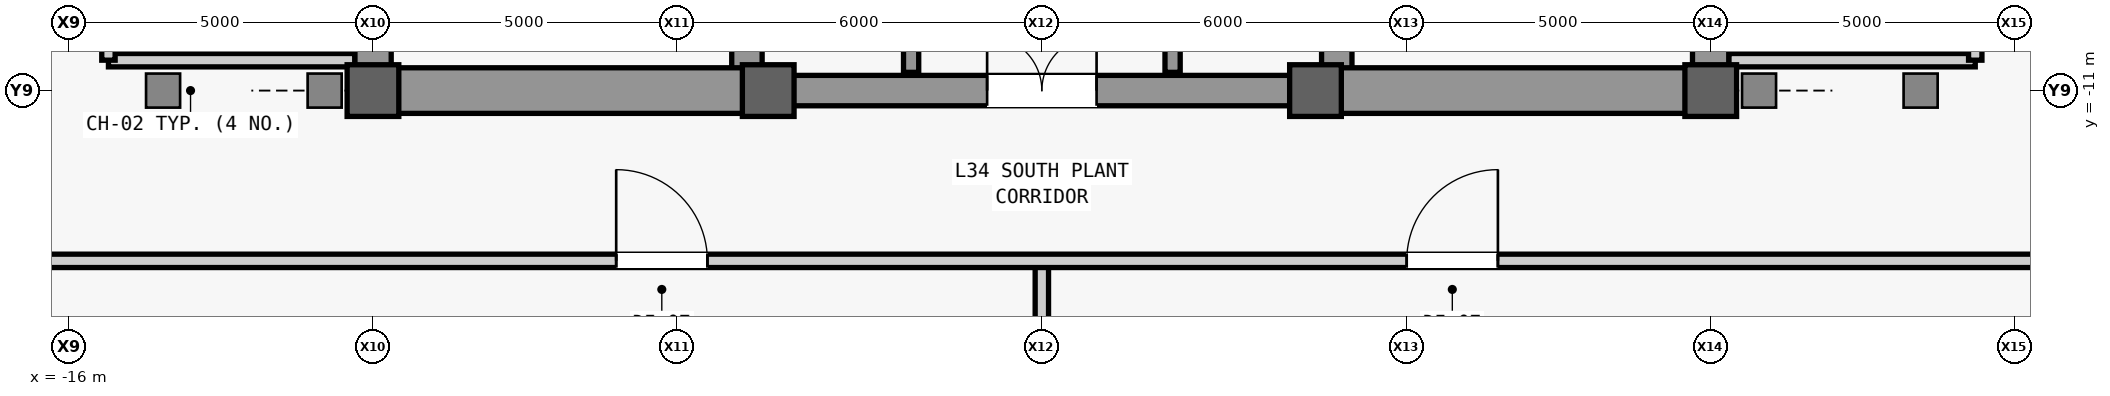
"""IFC4 building model, lengths in metres.
Left out: names, types, materials, properties, quantities, classifications, styles, units other than length and angle.
Written with IfcOpenShell. Run it as: python <this file> out.ifc"""

import sys

from ifc_helpers import new_model, si_unit, direction, frame, frame_2d, origin, origin_2d, place, context, subcontext, project, spatial, rectangle, extrude, source, transform, mapped, element, fill, save


model = new_model("IFC4")
c1 = context("Model", 3, precision=1e-05, world=origin(), true_north=direction((0.0, 1.0)))
c2 = subcontext(c1, "Body", "Model", "MODEL_VIEW")
j1 = project(units=[si_unit("LENGTHUNIT", "METRE"), si_unit("PLANEANGLEUNIT", "RADIAN")], contexts=[c1])
p1 = place(None, origin())
s1 = spatial("IfcSite", under=j1, at=p1, CompositionType="ELEMENT")
p2 = place(p1, origin())
s2 = spatial("IfcBuilding", under=s1, at=p2, CompositionType="ELEMENT")
p3 = place(p2, frame((0.0, 0.0, 149.9)))
s3 = spatial("IfcBuildingStorey", under=s2, at=p3, CompositionType="ELEMENT", Elevation=149.9)
m1 = source(origin(), c2, "Body", "SweptSolid", [
    extrude(rectangle(XDim=22.0, YDim=0.6, at=frame_2d((11.0, 0.0))), origin(), (0.0, 0.0, 1.0), 4.98),
])
p4 = place(p3, frame((-11.0, -11.0, 0.0), z_axis=(0.0, 0.0, 1.0), x_axis=(0.0, 1.0, 0.0)))
e1 = element("IfcWall", 1, at=p4, inside=s3, PredefinedType="SHEAR", context=c2, shape_type="MappedRepresentation", body=[
    mapped(m1, transform((0.0, 0.0, 0.0), scale=1.0)),
])
m2 = source(origin(), c2, "Body", "SweptSolid", [
    extrude(rectangle(XDim=1.1, YDim=2.2, at=frame_2d((0.55, 1.1))), frame((0.0, 0.31, 0.0), z_axis=(0.0, -1.0, 0.0), x_axis=(1.0, 0.0, 0.0)), (0.0, 0.0, 1.0), 0.62),
])
p5 = place(p4, frame((0.8, 0.0, 0.0)))
e2 = element("IfcOpeningElement", 2, at=p5, cuts=e1, PredefinedType="OPENING", context=c2, shape_type="MappedRepresentation", body=[
    mapped(m2, transform((0.0, 0.0, 0.0), scale=1.0)),
])
p6 = place(p4, frame((12.5, 0.0, 0.0)))
e3 = element("IfcOpeningElement", 3, at=p6, cuts=e1, PredefinedType="OPENING", context=c2, shape_type="MappedRepresentation", body=[
    mapped(m2, transform((0.0, 0.0, 0.0), scale=1.0)),
])
m3 = source(origin(), c2, "Body", "SweptSolid", [
    extrude(rectangle(XDim=0.9, YDim=2.15, at=frame_2d((0.45, 1.075))), frame((0.0, 0.31, 0.0), z_axis=(0.0, -1.0, 0.0), x_axis=(1.0, 0.0, 0.0)), (0.0, 0.0, 1.0), 0.62),
])
p7 = place(p4, frame((7.575, 0.0, 0.0)))
e4 = element("IfcOpeningElement", 4, at=p7, cuts=e1, PredefinedType="OPENING", context=c2, shape_type="MappedRepresentation", body=[
    mapped(m3, transform((0.0, 0.0, 0.0), scale=1.0)),
])
m4 = source(origin(), c2, "Body", "SweptSolid", [
    extrude(rectangle(XDim=1.3, YDim=2.3, at=frame_2d((0.65, 1.15))), frame((0.0, 0.31, 0.0), z_axis=(0.0, -1.0, 0.0), x_axis=(1.0, 0.0, 0.0)), (0.0, 0.0, 1.0), 0.62),
])
p8 = place(p4, frame((2.7, 0.0, 0.0)))
e5 = element("IfcOpeningElement", 5, at=p8, cuts=e1, PredefinedType="OPENING", context=c2, shape_type="MappedRepresentation", body=[
    mapped(m4, transform((0.0, 0.0, 0.0), scale=1.0)),
])
p9 = place(p3, frame((11.0, -11.0, 0.0), z_axis=(0.0, 0.0, 1.0), x_axis=(0.0, 1.0, 0.0)))
e6 = element("IfcWall", 6, at=p9, inside=s3, PredefinedType="SHEAR", context=c2, shape_type="MappedRepresentation", body=[
    mapped(m1, transform((0.0, 0.0, 0.0), scale=1.0)),
])
p10 = place(p9, frame((0.8, 0.0, 0.0)))
e7 = element("IfcOpeningElement", 7, at=p10, cuts=e6, PredefinedType="OPENING", context=c2, shape_type="MappedRepresentation", body=[
    mapped(m2, transform((0.0, 0.0, 0.0), scale=1.0)),
])
p11 = place(p9, frame((7.575, 0.0, 0.0)))
e8 = element("IfcOpeningElement", 8, at=p11, cuts=e6, PredefinedType="OPENING", context=c2, shape_type="MappedRepresentation", body=[
    mapped(m3, transform((0.0, 0.0, 0.0), scale=1.0)),
])
p12 = place(p9, frame((2.7, 0.0, 0.0)))
e9 = element("IfcOpeningElement", 9, at=p12, cuts=e6, PredefinedType="OPENING", context=c2, shape_type="MappedRepresentation", body=[
    mapped(m4, transform((0.0, 0.0, 0.0), scale=1.0)),
])
p13 = place(p9, frame((13.35, 0.0, 0.0)))
e10 = element("IfcOpeningElement", 10, at=p13, cuts=e6, PredefinedType="OPENING", context=c2, shape_type="MappedRepresentation", body=[
    mapped(m4, transform((0.0, 0.0, 0.0), scale=1.0)),
])
m5 = source(origin(), c2, "Body", "SweptSolid", [
    extrude(rectangle(XDim=21.4, YDim=0.5, at=frame_2d((10.7, 0.0))), origin(), (0.0, 0.0, 1.0), 4.98),
])
for number, where, z_axis, x_axis in (
    (11, (-4.85, -10.7, 0.0), (0.0, 0.0, 1.0), (0.0, 1.0, 0.0)),
    (12, (4.85, -10.7, 0.0), (0.0, 0.0, 1.0), (0.0, 1.0, 0.0)),
):
    element("IfcWall", number, at=place(p3, frame(where, z_axis=z_axis, x_axis=x_axis)), inside=s3, PredefinedType="SHEAR", context=c2, shape_type="MappedRepresentation", body=[
        mapped(m5, transform((0.0, 0.0, 0.0), scale=1.0)),
    ])
m6 = source(origin(), c2, "Body", "SweptSolid", [
    extrude(rectangle(XDim=5.85, YDim=0.75, at=frame_2d((2.925, 0.0))), origin(), (0.0, 0.0, 1.0), 4.98),
])
for number, where, z_axis, x_axis in (
    (13, (-10.7, -11.0, 0.0), (0.0, 0.0, 1.0), (1.0, 0.0, 0.0)),
    (14, (4.85, -11.0, 0.0), (0.0, 0.0, 1.0), (1.0, 0.0, 0.0)),
):
    element("IfcWall", number, at=place(p3, frame(where, z_axis=z_axis, x_axis=x_axis)), inside=s3, PredefinedType="SHEAR", context=c2, shape_type="MappedRepresentation", body=[
        mapped(m6, transform((0.0, 0.0, 0.0), scale=1.0)),
    ])
m7 = source(origin(), c2, "Body", "SweptSolid", [
    extrude(rectangle(XDim=9.2, YDim=0.5, at=frame_2d((4.6, 0.0))), origin(), (0.0, 0.0, 1.0), 4.98),
])
p14 = place(p3, frame((-4.6, -11.0, 0.0), z_axis=(0.0, 0.0, 1.0), x_axis=(1.0, 0.0, 0.0)))
e15 = element("IfcWall", 15, at=p14, inside=s3, PredefinedType="SHEAR", context=c2, shape_type="MappedRepresentation", body=[
    mapped(m7, transform((0.0, 0.0, 0.0), scale=1.0)),
])
m8 = source(origin(), c2, "Body", "SweptSolid", [
    extrude(rectangle(XDim=1.8, YDim=2.25, at=frame_2d((0.9, 1.125))), frame((0.0, 0.26, 0.0), z_axis=(0.0, -1.0, 0.0), x_axis=(1.0, 0.0, 0.0)), (0.0, 0.0, 1.0), 0.52),
])
p15 = place(p14, frame((3.7, 0.0, 0.0)))
e16 = element("IfcOpeningElement", 16, at=p15, cuts=e15, PredefinedType="OPENING", context=c2, shape_type="MappedRepresentation", body=[
    mapped(m8, transform((0.0, 0.0, 0.0), scale=1.0)),
])
m9 = source(origin(), c2, "Body", "SweptSolid", [
    extrude(rectangle(XDim=0.85, YDim=0.85, at=origin_2d()), origin(), (0.0, 0.0, 1.0), 5.2),
])
for number, where, z_axis, x_axis in (
    (17, (-11.0, -11.0, 0.0), (0.0, 0.0, 1.0), (1.0, 0.0, 0.0)),
    (18, (-4.5, -11.0, 0.0), (0.0, 0.0, 1.0), (1.0, 0.0, 0.0)),
    (19, (4.5, -11.0, 0.0), (0.0, 0.0, 1.0), (1.0, 0.0, 0.0)),
    (20, (11.0, -11.0, 0.0), (0.0, 0.0, 1.0), (1.0, 0.0, 0.0)),
):
    element("IfcColumn", number, at=place(p3, frame(where, z_axis=z_axis, x_axis=x_axis)), inside=s3, PredefinedType="COLUMN", context=c2, shape_type="MappedRepresentation", body=[
        mapped(m9, transform((0.0, 0.0, 0.0), scale=1.0)),
    ])
m10 = source(origin(), c2, "Body", "SweptSolid", [
    extrude(rectangle(XDim=4.05, YDim=0.22, at=frame_2d((2.025, 0.0))), origin(), (0.0, 0.0, 1.0), 4.98),
])
p16 = place(p3, frame((-15.35, -10.5, 0.0), z_axis=(0.0, 0.0, 1.0), x_axis=(1.0, 0.0, 0.0)))
e21 = element("IfcWall", 21, at=p16, inside=s3, PredefinedType="PARTITIONING", context=c2, shape_type="MappedRepresentation", body=[
    mapped(m10, transform((0.0, 0.0, 0.0), scale=1.0)),
])
m11 = source(origin(), c2, "Body", "SweptSolid", [
    extrude(rectangle(XDim=4.4, YDim=0.22, at=frame_2d((2.2, 0.0))), origin(), (0.0, 0.0, 1.0), 4.98),
])
p17 = place(p3, frame((-15.35, -10.5, 0.0), z_axis=(0.0, 0.0, 1.0), x_axis=(0.0, 1.0, 0.0)))
e22 = element("IfcWall", 22, at=p17, inside=s3, PredefinedType="PARTITIONING", context=c2, shape_type="MappedRepresentation", body=[
    mapped(m11, transform((0.0, 0.0, 0.0), scale=1.0)),
])
m12 = source(origin(), c2, "Body", "SweptSolid", [
    extrude(rectangle(XDim=1.2, YDim=2.2, at=frame_2d((0.6, 1.1))), frame((0.0, 0.12, 0.0), z_axis=(0.0, -1.0, 0.0), x_axis=(1.0, 0.0, 0.0)), (0.0, 0.0, 1.0), 0.24),
])
p18 = place(p17, frame((1.6, 0.0, 0.0)))
e23 = element("IfcOpeningElement", 23, at=p18, cuts=e22, PredefinedType="OPENING", context=c2, shape_type="MappedRepresentation", body=[
    mapped(m12, transform((0.0, 0.0, 0.0), scale=1.0)),
])
p19 = place(p3, frame((11.3, -10.5, 0.0), z_axis=(0.0, 0.0, 1.0), x_axis=(1.0, 0.0, 0.0)))
e24 = element("IfcWall", 24, at=p19, inside=s3, PredefinedType="PARTITIONING", context=c2, shape_type="MappedRepresentation", body=[
    mapped(m10, transform((0.0, 0.0, 0.0), scale=1.0)),
])
p20 = place(p3, frame((15.35, -10.5, 0.0), z_axis=(0.0, 0.0, 1.0), x_axis=(0.0, 1.0, 0.0)))
e25 = element("IfcWall", 25, at=p20, inside=s3, PredefinedType="PARTITIONING", context=c2, shape_type="MappedRepresentation", body=[
    mapped(m11, transform((0.0, 0.0, 0.0), scale=1.0)),
])
p21 = place(p20, frame((1.6, 0.0, 0.0)))
e26 = element("IfcOpeningElement", 26, at=p21, cuts=e25, PredefinedType="OPENING", context=c2, shape_type="MappedRepresentation", body=[
    mapped(m12, transform((0.0, 0.0, 0.0), scale=1.0)),
])
m13 = source(origin(), c2, "Body", "SweptSolid", [
    extrude(rectangle(XDim=5.4, YDim=0.25, at=frame_2d((2.7, 0.0))), origin(), (0.0, 0.0, 1.0), 4.98),
])
for number, where, z_axis, x_axis in (
    (27, (-2.15, -10.7, 0.0), (0.0, 0.0, 1.0), (0.0, 1.0, 0.0)),
    (28, (2.15, -10.7, 0.0), (0.0, 0.0, 1.0), (0.0, 1.0, 0.0)),
):
    element("IfcWall", number, at=place(p3, frame(where, z_axis=z_axis, x_axis=x_axis)), inside=s3, PredefinedType="SHEAR", context=c2, shape_type="MappedRepresentation", body=[
        mapped(m13, transform((0.0, 0.0, 0.0), scale=1.0)),
    ])
m14 = source(origin(), c2, "Body", "SweptSolid", [
    extrude(rectangle(XDim=16.2, YDim=0.22, at=frame_2d((8.1, 0.0))), origin(), (0.0, 0.0, 1.0), 4.127),
])
p22 = place(p3, frame((0.0, -30.0, 0.0), z_axis=(0.0, 0.0, 1.0), x_axis=(0.0, 1.0, 0.0)))
e29 = element("IfcWall", 29, at=p22, inside=s3, PredefinedType="PARTITIONING", context=c2, shape_type="MappedRepresentation", body=[
    mapped(m14, transform((0.0, 0.0, 0.0), scale=1.0)),
])
m15 = source(origin(), c2, "Body", "SweptSolid", [
    extrude(rectangle(XDim=51.0, YDim=0.22, at=frame_2d((25.5, 0.0))), origin(), (0.0, 0.0, 1.0), 4.98),
])
p23 = place(p3, frame((-25.5, -13.8, 0.0), z_axis=(0.0, 0.0, 1.0), x_axis=(1.0, 0.0, 0.0)))
e30 = element("IfcWall", 30, at=p23, inside=s3, PredefinedType="PARTITIONING", context=c2, shape_type="MappedRepresentation", body=[
    mapped(m15, transform((0.0, 0.0, 0.0), scale=1.0)),
])
m16 = source(origin(), c2, "Body", "SweptSolid", [
    extrude(rectangle(XDim=1.5, YDim=2.3, at=frame_2d((0.75, 1.15))), frame((0.0, 0.12, 0.0), z_axis=(0.0, -1.0, 0.0), x_axis=(1.0, 0.0, 0.0)), (0.0, 0.0, 1.0), 0.24),
])
p24 = place(p23, frame((18.5, 0.0, 0.0)))
e31 = element("IfcOpeningElement", 31, at=p24, cuts=e30, PredefinedType="OPENING", context=c2, shape_type="MappedRepresentation", body=[
    mapped(m16, transform((0.0, 0.0, 0.0), scale=1.0)),
])
p25 = place(p23, frame((31.5, 0.0, 0.0)))
e32 = element("IfcOpeningElement", 32, at=p25, cuts=e30, PredefinedType="OPENING", context=c2, shape_type="MappedRepresentation", body=[
    mapped(m16, transform((0.0, 0.0, 0.0), scale=1.0)),
])
m17 = source(origin(), c2, "Body", "SweptSolid", [
    extrude(rectangle(XDim=1.8, YDim=2.25, at=frame_2d((0.9, 1.125))), frame((0.0, 0.025, 0.0), z_axis=(0.0, -1.0, 0.0), x_axis=(1.0, 0.0, 0.0)), (0.0, 0.0, 1.0), 0.05),
])
p26 = place(p15, origin())
e33 = element("IfcDoor", 33, at=p26, inside=s3, OperationType="SINGLE_SWING_LEFT", PredefinedType="DOOR", context=c2, shape_type="MappedRepresentation", body=[
    mapped(m17, transform((0.0, 0.0, 0.0), scale=1.0)),
])
fill(e16, e33)
m18 = source(origin(), c2, "Body", "SweptSolid", [
    extrude(rectangle(XDim=1.5, YDim=2.3, at=frame_2d((0.75, 1.15))), frame((0.0, 0.025, 0.0), z_axis=(0.0, -1.0, 0.0), x_axis=(1.0, 0.0, 0.0)), (0.0, 0.0, 1.0), 0.05),
])
p27 = place(p24, origin())
e34 = element("IfcDoor", 34, at=p27, inside=s3, OperationType="SINGLE_SWING_LEFT", PredefinedType="DOOR", context=c2, shape_type="MappedRepresentation", body=[
    mapped(m18, transform((0.0, 0.0, 0.0), scale=1.0)),
])
fill(e31, e34)
p28 = place(p25, origin())
e35 = element("IfcDoor", 35, at=p28, inside=s3, OperationType="SINGLE_SWING_RIGHT", PredefinedType="DOOR", context=c2, shape_type="MappedRepresentation", body=[
    mapped(m18, transform((0.0, 0.0, 0.0), scale=1.0)),
])
fill(e32, e35)
save(model, sys.argv[1])
